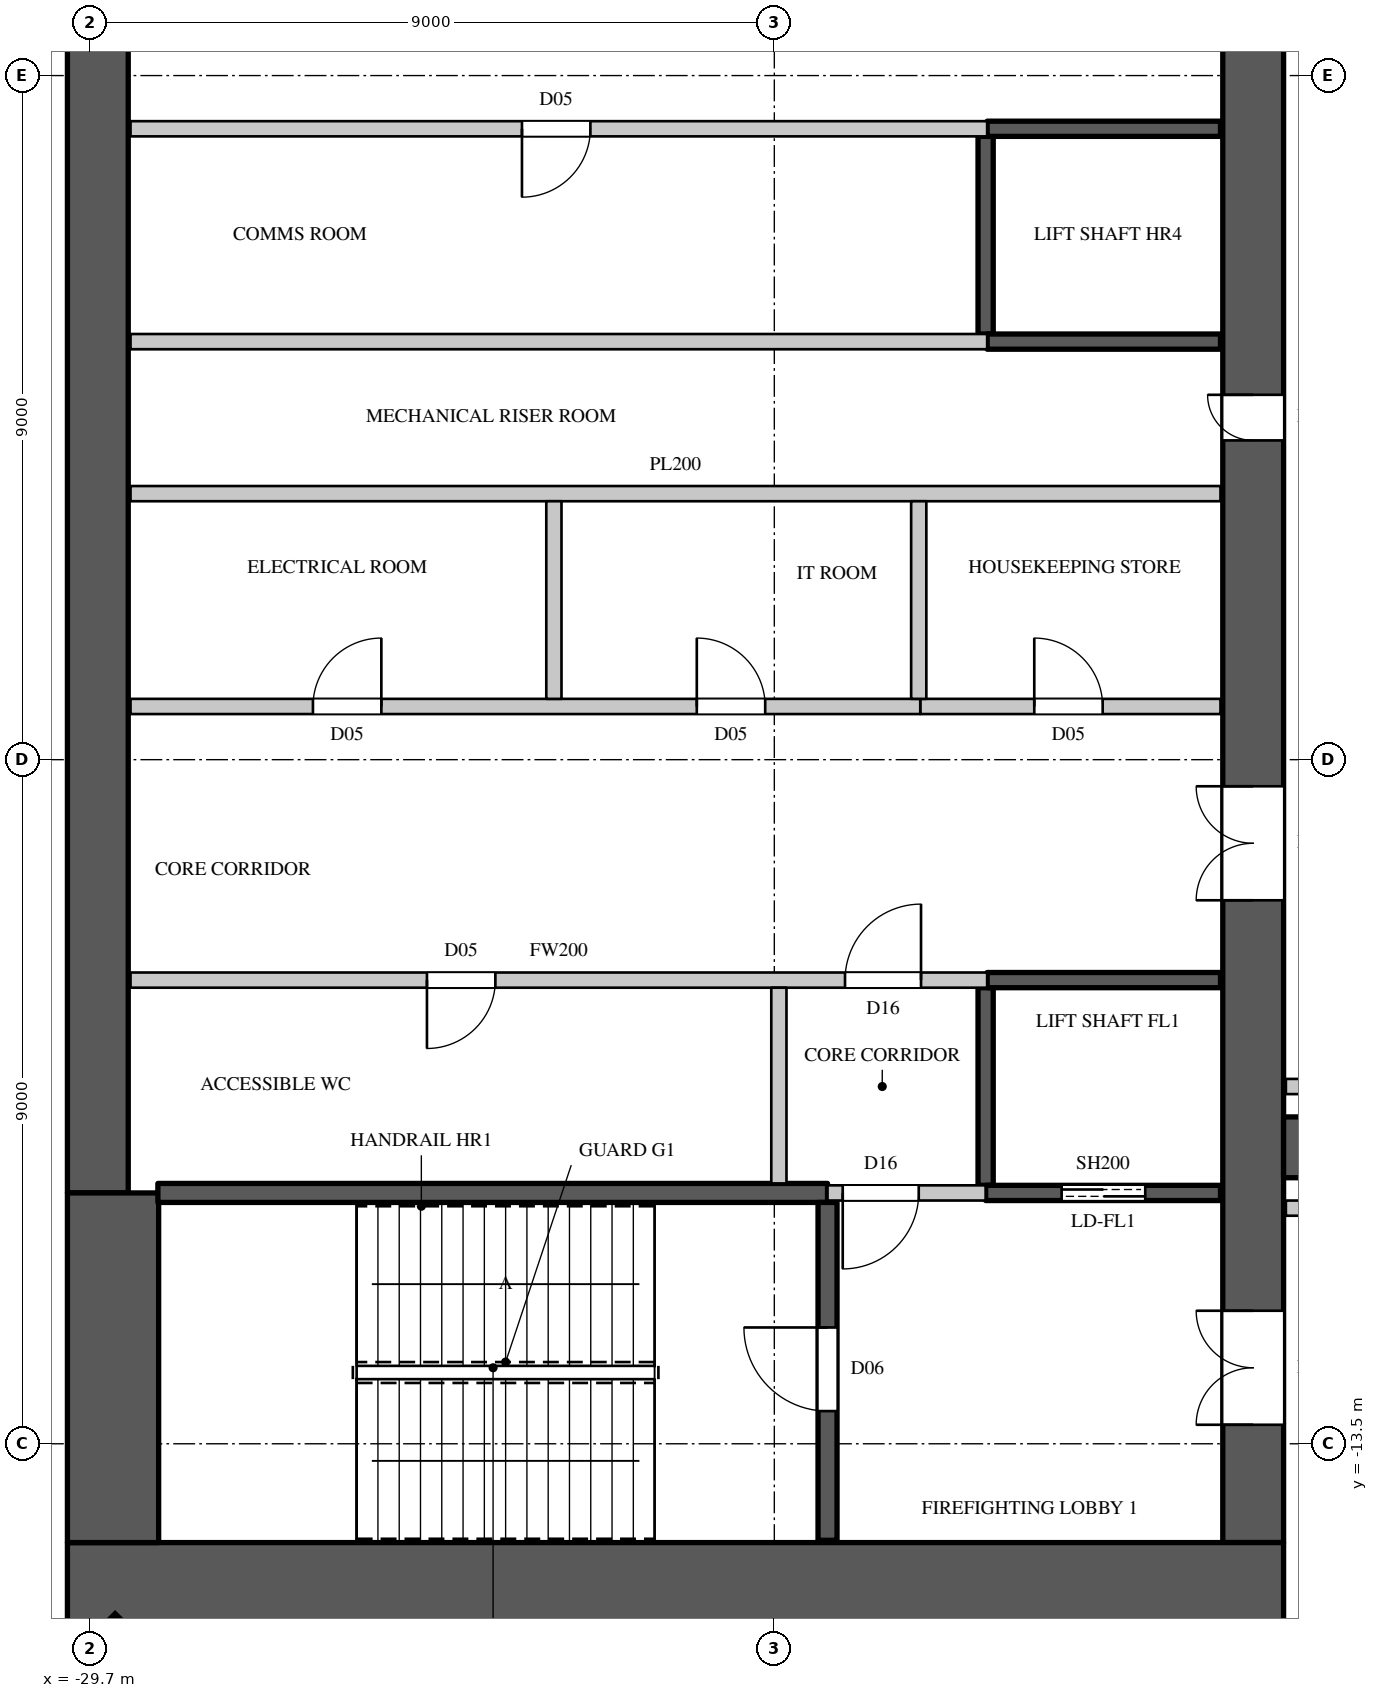
"""IFC4 building model, lengths in metres.
Left out: names, types, materials, properties, quantities, classifications, styles, units other than length and angle.
Written with IfcOpenShell. Run it as: python <this file> out.ifc"""

import sys

from ifc_helpers import new_model, si_unit, direction, frame, frame_2d, origin, origin_2d, place, context, subcontext, project, spatial, rectangle, extrude, element, fill, save


model = new_model("IFC4")
c1 = context("Model", 3, precision=1e-05, world=origin(), true_north=direction((0.0, 1.0)))
c2 = subcontext(c1, "Body", "Model", "MODEL_VIEW")
j1 = project(units=[si_unit("LENGTHUNIT", "METRE"), si_unit("PLANEANGLEUNIT", "RADIAN")], contexts=[c1])
p1 = place(None, origin())
s1 = spatial("IfcSite", under=j1, at=p1, CompositionType="ELEMENT")
p2 = place(p1, origin())
s2 = spatial("IfcBuilding", under=s1, at=p2, CompositionType="ELEMENT")
p3 = place(p2, frame((0.0, 0.0, 238.4)))
s3 = spatial("IfcBuildingStorey", under=s2, at=p3, CompositionType="ELEMENT", Elevation=238.4)
p4 = place(p3, frame((-29.443, -16.443, 0.0), z_axis=(0.0, 0.0, 1.0), x_axis=(0.707106781187, -0.707106781187, 0.0)))
e1 = element("IfcColumn", 1, at=p4, inside=s3, PredefinedType="COLUMN", context=c2, shape_type="SweptSolid", body=[
    extrude(rectangle(XDim=0.9, YDim=1.1, at=origin_2d()), origin(), (0.0, 0.0, 1.0), 5.0),
])
p5 = place(p3, frame((-14.0, -9.6, 0.0), z_axis=(0.0, 0.0, 1.0), x_axis=(1.0, 0.0, 0.0)))
e2 = element("IfcWall", 2, at=p5, inside=s3, PredefinedType="SOLIDWALL", context=c2, shape_type="SweptSolid", body=[
    extrude(rectangle(XDim=12.0, YDim=0.8, at=frame_2d((6.0, 0.0))), origin(), (0.0, 0.0, 1.0), 4.7),
])
p6 = place(p3, frame((-30.0, -15.4, 0.0), z_axis=(0.0, 0.0, 1.0), x_axis=(1.0, 0.0, 0.0)))
e3 = element("IfcWall", 3, at=p6, inside=s3, PredefinedType="SHEAR", context=c2, shape_type="SweptSolid", body=[
    extrude(rectangle(XDim=16.0, YDim=1.2, at=frame_2d((8.0, 0.0))), origin(), (0.0, 0.0, 1.0), 5.0),
])
p7 = place(p3, frame((-14.4, -14.8, 0.0), z_axis=(0.0, 0.0, 1.0), x_axis=(0.0, 1.0, 0.0)))
e4 = element("IfcWall", 4, at=p7, inside=s3, PredefinedType="SHEAR", context=c2, shape_type="SweptSolid", body=[
    extrude(rectangle(XDim=29.6, YDim=0.8, at=frame_2d((14.8, 0.0))), origin(), (0.0, 0.0, 1.0), 5.0),
])
p8 = place(p7, frame((1.55, 0.0, 0.0)))
e5 = element("IfcOpeningElement", 5, at=p8, cuts=e4, PredefinedType="OPENING", context=c2, shape_type="SweptSolid", body=[
    extrude(rectangle(XDim=1.5, YDim=2.4, at=frame_2d((0.75, 1.2))), frame((0.0, 0.41, 0.0), z_axis=(0.0, -1.0, 0.0), x_axis=(1.0, 0.0, 0.0)), (0.0, 0.0, 1.0), 0.82),
])
p9 = place(p7, frame((26.55, 0.0, 0.0)))
e6 = element("IfcOpeningElement", 6, at=p9, cuts=e4, PredefinedType="OPENING", context=c2, shape_type="SweptSolid", body=[
    extrude(rectangle(XDim=1.5, YDim=2.4, at=frame_2d((0.75, 1.2))), frame((0.0, 0.41, 0.0), z_axis=(0.0, -1.0, 0.0), x_axis=(1.0, 0.0, 0.0)), (0.0, 0.0, 1.0), 0.82),
])
p10 = place(p7, frame((8.45, 0.0, 0.0)))
e7 = element("IfcOpeningElement", 7, at=p10, cuts=e4, PredefinedType="OPENING", context=c2, shape_type="SweptSolid", body=[
    extrude(rectangle(XDim=1.5, YDim=2.4, at=frame_2d((0.75, 1.2))), frame((0.0, 0.41, 0.0), z_axis=(0.0, -1.0, 0.0), x_axis=(1.0, 0.0, 0.0)), (0.0, 0.0, 1.0), 0.82),
])
p11 = place(p7, frame((19.65, 0.0, 0.0)))
e8 = element("IfcOpeningElement", 8, at=p11, cuts=e4, PredefinedType="OPENING", context=c2, shape_type="SweptSolid", body=[
    extrude(rectangle(XDim=1.5, YDim=2.4, at=frame_2d((0.75, 1.2))), frame((0.0, 0.41, 0.0), z_axis=(0.0, -1.0, 0.0), x_axis=(1.0, 0.0, 0.0)), (0.0, 0.0, 1.0), 0.82),
])
p12 = place(p7, frame((14.5, 0.0, 0.0)))
e9 = element("IfcOpeningElement", 9, at=p12, cuts=e4, PredefinedType="OPENING", context=c2, shape_type="SweptSolid", body=[
    extrude(rectangle(XDim=0.6, YDim=2.0, at=frame_2d((0.3, 1.0))), frame((0.0, 0.41, 0.0), z_axis=(0.0, -1.0, 0.0), x_axis=(1.0, 0.0, 0.0)), (0.0, 0.0, 1.0), 0.82),
])
p13 = place(p3, frame((-29.6, -10.2, 0.0), z_axis=(0.0, 0.0, 1.0), x_axis=(0.0, 1.0, 0.0)))
e10 = element("IfcWall", 10, at=p13, inside=s3, PredefinedType="SHEAR", context=c2, shape_type="SweptSolid", body=[
    extrude(rectangle(XDim=20.4, YDim=0.8, at=frame_2d((10.2, 0.0))), origin(), (0.0, 0.0, 1.0), 5.0),
])
p14 = place(p3, frame((-29.4, -14.8, 0.0), z_axis=(0.0, 0.0, 1.0), x_axis=(0.0, 1.0, 0.0)))
e11 = element("IfcWall", 11, at=p14, inside=s3, PredefinedType="SHEAR", context=c2, shape_type="SweptSolid", body=[
    extrude(rectangle(XDim=4.6, YDim=1.2, at=frame_2d((2.3, 0.0))), origin(), (0.0, 0.0, 1.0), 5.0),
])
p15 = place(p3, frame((-29.17, -7.4, 0.0), z_axis=(0.0, 0.0, 1.0), x_axis=(1.0, 0.0, 0.0)))
e12 = element("IfcWall", 12, at=p15, inside=s3, PredefinedType="PARTITIONING", context=c2, shape_type="SweptSolid", body=[
    extrude(rectangle(XDim=11.27, YDim=0.2, at=frame_2d((5.635, 0.0))), origin(), (0.0, 0.0, 1.0), 4.7),
])
p16 = place(p15, frame((9.4, 0.0, 0.0)))
e13 = element("IfcOpeningElement", 13, at=p16, cuts=e12, PredefinedType="OPENING", context=c2, shape_type="SweptSolid", body=[
    extrude(rectangle(XDim=1.0, YDim=2.2, at=frame_2d((0.5, 1.1))), frame((0.0, 0.11, 0.0), z_axis=(0.0, -1.0, 0.0), x_axis=(1.0, 0.0, 0.0)), (0.0, 0.0, 1.0), 0.22),
])
p17 = place(p15, frame((3.9, 0.0, 0.0)))
e14 = element("IfcOpeningElement", 14, at=p17, cuts=e12, PredefinedType="OPENING", context=c2, shape_type="SweptSolid", body=[
    extrude(rectangle(XDim=0.9, YDim=2.2, at=frame_2d((0.45, 1.1))), frame((0.0, 0.11, 0.0), z_axis=(0.0, -1.0, 0.0), x_axis=(1.0, 0.0, 0.0)), (0.0, 0.0, 1.0), 0.22),
])
p18 = place(p3, frame((-20.64, -10.075, 0.0), z_axis=(0.0, 0.0, 1.0), x_axis=(0.0, 1.0, 0.0)))
e15 = element("IfcWall", 15, at=p18, inside=s3, PredefinedType="PARTITIONING", context=c2, shape_type="SweptSolid", body=[
    extrude(rectangle(XDim=2.575, YDim=0.2, at=frame_2d((1.288, 0.0))), origin(), (0.0, 0.0, 1.0), 4.7),
])
p19 = place(p3, frame((-20.0, -10.2, 0.0), z_axis=(0.0, 0.0, 1.0), x_axis=(1.0, 0.0, 0.0)))
e16 = element("IfcWall", 16, at=p19, inside=s3, PredefinedType="PARTITIONING", context=c2, shape_type="SweptSolid", body=[
    extrude(rectangle(XDim=2.08, YDim=0.2, at=frame_2d((1.04, 0.0))), origin(), (0.0, 0.0, 1.0), 4.7),
])
p20 = place(p19, frame((0.2, 0.0, 0.0)))
e17 = element("IfcOpeningElement", 17, at=p20, cuts=e16, PredefinedType="OPENING", context=c2, shape_type="SweptSolid", body=[
    extrude(rectangle(XDim=1.0, YDim=2.2, at=frame_2d((0.5, 1.1))), frame((0.0, 0.11, 0.0), z_axis=(0.0, -1.0, 0.0), x_axis=(1.0, 0.0, 0.0)), (0.0, 0.0, 1.0), 0.22),
])
p21 = place(p3, frame((-18.78, -3.8, 0.0), z_axis=(0.0, 0.0, 1.0), x_axis=(1.0, 0.0, 0.0)))
e18 = element("IfcWall", 18, at=p21, inside=s3, PredefinedType="PARTITIONING", context=c2, shape_type="SweptSolid", body=[
    extrude(rectangle(XDim=3.95, YDim=0.2, at=frame_2d((1.975, 0.0))), origin(), (0.0, 0.0, 1.0), 4.7),
])
p22 = place(p21, frame((1.5, 0.0, 0.0)))
e19 = element("IfcOpeningElement", 19, at=p22, cuts=e18, PredefinedType="OPENING", context=c2, shape_type="SweptSolid", body=[
    extrude(rectangle(XDim=0.9, YDim=2.2, at=frame_2d((0.45, 1.1))), frame((0.0, 0.11, 0.0), z_axis=(0.0, -1.0, 0.0), x_axis=(1.0, 0.0, 0.0)), (0.0, 0.0, 1.0), 0.22),
])
p23 = place(p3, frame((-13.97, -10.4, 0.0), z_axis=(0.0, 0.0, 1.0), x_axis=(1.0, 0.0, 0.0)))
e20 = element("IfcWall", 20, at=p23, inside=s3, PredefinedType="PARTITIONING", context=c2, shape_type="SweptSolid", body=[
    extrude(rectangle(XDim=2.37, YDim=0.2, at=frame_2d((1.185, 0.0))), origin(), (0.0, 0.0, 1.0), 4.7),
])
p24 = place(p3, frame((-13.97, -8.8, 0.0), z_axis=(0.0, 0.0, 1.0), x_axis=(1.0, 0.0, 0.0)))
e21 = element("IfcWall", 21, at=p24, inside=s3, PredefinedType="PARTITIONING", context=c2, shape_type="SweptSolid", body=[
    extrude(rectangle(XDim=2.29, YDim=0.2, at=frame_2d((1.145, 0.0))), origin(), (0.0, 0.0, 1.0), 4.7),
])
p25 = place(p3, frame((-29.17, -3.8, 0.0), z_axis=(0.0, 0.0, 1.0), x_axis=(1.0, 0.0, 0.0)))
e22 = element("IfcWall", 22, at=p25, inside=s3, PredefinedType="PARTITIONING", context=c2, shape_type="SweptSolid", body=[
    extrude(rectangle(XDim=10.39, YDim=0.2, at=frame_2d((5.195, 0.0))), origin(), (0.0, 0.0, 1.0), 4.7),
])
p26 = place(p25, frame((2.4, 0.0, 0.0)))
e23 = element("IfcOpeningElement", 23, at=p26, cuts=e22, PredefinedType="OPENING", context=c2, shape_type="SweptSolid", body=[
    extrude(rectangle(XDim=0.9, YDim=2.2, at=frame_2d((0.45, 1.1))), frame((0.0, 0.11, 0.0), z_axis=(0.0, -1.0, 0.0), x_axis=(1.0, 0.0, 0.0)), (0.0, 0.0, 1.0), 0.22),
])
p27 = place(p25, frame((7.45, 0.0, 0.0)))
e24 = element("IfcOpeningElement", 24, at=p27, cuts=e22, PredefinedType="OPENING", context=c2, shape_type="SweptSolid", body=[
    extrude(rectangle(XDim=0.9, YDim=2.2, at=frame_2d((0.45, 1.1))), frame((0.0, 0.11, 0.0), z_axis=(0.0, -1.0, 0.0), x_axis=(1.0, 0.0, 0.0)), (0.0, 0.0, 1.0), 0.22),
])
p28 = place(p3, frame((-29.17, -1.0, 0.0), z_axis=(0.0, 0.0, 1.0), x_axis=(1.0, 0.0, 0.0)))
e25 = element("IfcWall", 25, at=p28, inside=s3, PredefinedType="PARTITIONING", context=c2, shape_type="SweptSolid", body=[
    extrude(rectangle(XDim=14.34, YDim=0.2, at=frame_2d((7.17, 0.0))), origin(), (0.0, 0.0, 1.0), 4.7),
])
p29 = place(p3, frame((-29.17, 1.0, 0.0), z_axis=(0.0, 0.0, 1.0), x_axis=(1.0, 0.0, 0.0)))
e26 = element("IfcWall", 26, at=p29, inside=s3, PredefinedType="PARTITIONING", context=c2, shape_type="SweptSolid", body=[
    extrude(rectangle(XDim=11.27, YDim=0.2, at=frame_2d((5.635, 0.0))), origin(), (0.0, 0.0, 1.0), 4.7),
])
p30 = place(p3, frame((-29.17, 3.8, 0.0), z_axis=(0.0, 0.0, 1.0), x_axis=(1.0, 0.0, 0.0)))
e27 = element("IfcWall", 27, at=p30, inside=s3, PredefinedType="PARTITIONING", context=c2, shape_type="SweptSolid", body=[
    extrude(rectangle(XDim=11.27, YDim=0.2, at=frame_2d((5.635, 0.0))), origin(), (0.0, 0.0, 1.0), 4.7),
])
p31 = place(p30, frame((5.15, 0.0, 0.0)))
e28 = element("IfcOpeningElement", 28, at=p31, cuts=e27, PredefinedType="OPENING", context=c2, shape_type="SweptSolid", body=[
    extrude(rectangle(XDim=0.9, YDim=2.2, at=frame_2d((0.45, 1.1))), frame((0.0, 0.11, 0.0), z_axis=(0.0, -1.0, 0.0), x_axis=(1.0, 0.0, 0.0)), (0.0, 0.0, 1.0), 0.22),
])
for number, where, z_axis, x_axis in (
    (29, (-23.6, -3.7, 0.0), (0.0, 0.0, 1.0), (0.0, 1.0, 0.0)),
    (30, (-18.8, -3.7, 0.0), (0.0, 0.0, 1.0), (0.0, 1.0, 0.0)),
):
    element("IfcWall", number, at=place(p3, frame(where, z_axis=z_axis, x_axis=x_axis)), inside=s3, PredefinedType="PARTITIONING", context=c2, shape_type="SweptSolid", body=[
        extrude(rectangle(XDim=2.6, YDim=0.2, at=frame_2d((1.3, 0.0))), origin(), (0.0, 0.0, 1.0), 4.7),
    ])
p32 = place(p3, frame((-17.92, -10.1, 0.0), z_axis=(0.0, 0.0, 1.0), x_axis=(0.0, 1.0, 0.0)))
e31 = element("IfcWall", 31, at=p32, inside=s3, PredefinedType="SHEAR", context=c2, shape_type="SweptSolid", body=[
    extrude(rectangle(XDim=2.6, YDim=0.2, at=frame_2d((1.3, 0.0))), origin(), (0.0, 0.0, 1.0), 4.7),
])
p33 = place(p3, frame((-17.92, -10.2, 0.0), z_axis=(0.0, 0.0, 1.0), x_axis=(1.0, 0.0, 0.0)))
e32 = element("IfcWall", 32, at=p33, inside=s3, PredefinedType="SHEAR", context=c2, shape_type="SweptSolid", body=[
    extrude(rectangle(XDim=3.09, YDim=0.2, at=frame_2d((1.545, 0.0))), origin(), (0.0, 0.0, 1.0), 4.7),
])
p34 = place(p33, frame((1.0, 0.0, 0.0)))
e33 = element("IfcOpeningElement", 33, at=p34, cuts=e32, PredefinedType="OPENING", context=c2, shape_type="SweptSolid", body=[
    extrude(rectangle(XDim=1.1, YDim=2.2, at=frame_2d((0.55, 1.1))), frame((0.0, 0.11, 0.0), z_axis=(0.0, -1.0, 0.0), x_axis=(1.0, 0.0, 0.0)), (0.0, 0.0, 1.0), 0.22),
])
p35 = place(p3, frame((-17.9, -7.4, 0.0), z_axis=(0.0, 0.0, 1.0), x_axis=(1.0, 0.0, 0.0)))
e34 = element("IfcWall", 34, at=p35, inside=s3, PredefinedType="SHEAR", context=c2, shape_type="SweptSolid", body=[
    extrude(rectangle(XDim=3.07, YDim=0.2, at=frame_2d((1.535, 0.0))), origin(), (0.0, 0.0, 1.0), 4.7),
])
p36 = place(p3, frame((-17.92, 1.1, 0.0), z_axis=(0.0, 0.0, 1.0), x_axis=(0.0, 1.0, 0.0)))
e35 = element("IfcWall", 35, at=p36, inside=s3, PredefinedType="SHEAR", context=c2, shape_type="SweptSolid", body=[
    extrude(rectangle(XDim=2.6, YDim=0.2, at=frame_2d((1.3, 0.0))), origin(), (0.0, 0.0, 1.0), 4.7),
])
for number, where, z_axis, x_axis in (
    (36, (-17.9, 1.0, 0.0), (0.0, 0.0, 1.0), (1.0, 0.0, 0.0)),
    (37, (-17.9, 3.8, 0.0), (0.0, 0.0, 1.0), (1.0, 0.0, 0.0)),
):
    element("IfcWall", number, at=place(p3, frame(where, z_axis=z_axis, x_axis=x_axis)), inside=s3, PredefinedType="SHEAR", context=c2, shape_type="SweptSolid", body=[
        extrude(rectangle(XDim=3.07, YDim=0.2, at=frame_2d((1.535, 0.0))), origin(), (0.0, 0.0, 1.0), 4.7),
    ])
p37 = place(p3, frame((-28.81, -10.2, 0.0), z_axis=(0.0, 0.0, 1.0), x_axis=(1.0, 0.0, 0.0)))
e38 = element("IfcWall", 38, at=p37, inside=s3, PredefinedType="SHEAR", context=c2, shape_type="SweptSolid", body=[
    extrude(rectangle(XDim=8.81, YDim=0.25, at=frame_2d((4.405, 0.0))), origin(), (0.0, 0.0, 1.0), 4.7),
])
p38 = place(p3, frame((-20.0, -14.77, 0.0), z_axis=(0.0, 0.0, 1.0), x_axis=(0.0, 1.0, 0.0)))
e39 = element("IfcWall", 39, at=p38, inside=s3, PredefinedType="SHEAR", context=c2, shape_type="SweptSolid", body=[
    extrude(rectangle(XDim=4.445, YDim=0.25, at=frame_2d((2.223, 0.0))), origin(), (0.0, 0.0, 1.0), 4.7),
])
p39 = place(p38, frame((1.7, 0.0, 0.0)))
e40 = element("IfcOpeningElement", 40, at=p39, cuts=e39, PredefinedType="OPENING", context=c2, shape_type="SweptSolid", body=[
    extrude(rectangle(XDim=1.1, YDim=2.2, at=frame_2d((0.55, 1.1))), frame((0.0, 0.135, 0.0), z_axis=(0.0, -1.0, 0.0), x_axis=(1.0, 0.0, 0.0)), (0.0, 0.0, 1.0), 0.27),
])
p40 = place(p39, origin())
e41 = element("IfcDoor", 41, at=p40, inside=s3, OperationType="SINGLE_SWING_RIGHT", PredefinedType="DOOR", context=c2, shape_type="SweptSolid", body=[
    extrude(rectangle(XDim=1.1, YDim=2.2, at=frame_2d((0.55, 1.1))), frame((0.0, 0.025, 0.0), z_axis=(0.0, -1.0, 0.0), x_axis=(1.0, 0.0, 0.0)), (0.0, 0.0, 1.0), 0.05),
])
fill(e40, e41)
p41 = place(p16, origin())
e42 = element("IfcDoor", 42, at=p41, inside=s3, OperationType="SINGLE_SWING_RIGHT", PredefinedType="DOOR", context=c2, shape_type="SweptSolid", body=[
    extrude(rectangle(XDim=1.0, YDim=2.2, at=frame_2d((0.5, 1.1))), frame((0.0, 0.025, 0.0), z_axis=(0.0, -1.0, 0.0), x_axis=(1.0, 0.0, 0.0)), (0.0, 0.0, 1.0), 0.05),
])
fill(e13, e42)
p42 = place(p20, origin())
e43 = element("IfcDoor", 43, at=p42, inside=s3, OperationType="SINGLE_SWING_RIGHT", PredefinedType="DOOR", context=c2, shape_type="SweptSolid", body=[
    extrude(rectangle(XDim=1.0, YDim=2.2, at=frame_2d((0.5, 1.1))), frame((0.0, 0.025, 0.0), z_axis=(0.0, -1.0, 0.0), x_axis=(1.0, 0.0, 0.0)), (0.0, 0.0, 1.0), 0.05),
])
fill(e17, e43)
p43 = place(p17, origin())
e44 = element("IfcDoor", 44, at=p43, inside=s3, OperationType="SINGLE_SWING_RIGHT", PredefinedType="DOOR", context=c2, shape_type="SweptSolid", body=[
    extrude(rectangle(XDim=0.9, YDim=2.2, at=frame_2d((0.45, 1.1))), frame((0.0, 0.025, 0.0), z_axis=(0.0, -1.0, 0.0), x_axis=(1.0, 0.0, 0.0)), (0.0, 0.0, 1.0), 0.05),
])
fill(e14, e44)
p44 = place(p26, origin())
e45 = element("IfcDoor", 45, at=p44, inside=s3, OperationType="SINGLE_SWING_RIGHT", PredefinedType="DOOR", context=c2, shape_type="SweptSolid", body=[
    extrude(rectangle(XDim=0.9, YDim=2.2, at=frame_2d((0.45, 1.1))), frame((0.0, 0.025, 0.0), z_axis=(0.0, -1.0, 0.0), x_axis=(1.0, 0.0, 0.0)), (0.0, 0.0, 1.0), 0.05),
])
fill(e23, e45)
p45 = place(p27, origin())
e46 = element("IfcDoor", 46, at=p45, inside=s3, OperationType="SINGLE_SWING_LEFT", PredefinedType="DOOR", context=c2, shape_type="SweptSolid", body=[
    extrude(rectangle(XDim=0.9, YDim=2.2, at=frame_2d((0.45, 1.1))), frame((0.0, 0.025, 0.0), z_axis=(0.0, -1.0, 0.0), x_axis=(1.0, 0.0, 0.0)), (0.0, 0.0, 1.0), 0.05),
])
fill(e24, e46)
p46 = place(p22, origin())
e47 = element("IfcDoor", 47, at=p46, inside=s3, OperationType="SINGLE_SWING_LEFT", PredefinedType="DOOR", context=c2, shape_type="SweptSolid", body=[
    extrude(rectangle(XDim=0.9, YDim=2.2, at=frame_2d((0.45, 1.1))), frame((0.0, 0.025, 0.0), z_axis=(0.0, -1.0, 0.0), x_axis=(1.0, 0.0, 0.0)), (0.0, 0.0, 1.0), 0.05),
])
fill(e19, e47)
p47 = place(p31, origin())
e48 = element("IfcDoor", 48, at=p47, inside=s3, OperationType="SINGLE_SWING_RIGHT", PredefinedType="DOOR", context=c2, shape_type="SweptSolid", body=[
    extrude(rectangle(XDim=0.9, YDim=2.2, at=frame_2d((0.45, 1.1))), frame((0.0, 0.025, 0.0), z_axis=(0.0, -1.0, 0.0), x_axis=(1.0, 0.0, 0.0)), (0.0, 0.0, 1.0), 0.05),
])
fill(e28, e48)
p48 = place(p34, origin())
e49 = element("IfcDoor", 49, at=p48, inside=s3, OperationType="DOUBLE_DOOR_SLIDING", PredefinedType="DOOR", context=c2, shape_type="SweptSolid", body=[
    extrude(rectangle(XDim=1.1, YDim=2.2, at=frame_2d((0.55, 1.1))), frame((0.0, 0.025, 0.0), z_axis=(0.0, -1.0, 0.0), x_axis=(1.0, 0.0, 0.0)), (0.0, 0.0, 1.0), 0.05),
])
fill(e33, e49)
p49 = place(p8, origin())
e50 = element("IfcDoor", 50, at=p49, inside=s3, OperationType="DOUBLE_DOOR_SINGLE_SWING", PredefinedType="DOOR", context=c2, shape_type="SweptSolid", body=[
    extrude(rectangle(XDim=1.5, YDim=2.4, at=frame_2d((0.75, 1.2))), frame((0.0, 0.395, 0.0), z_axis=(0.0, -1.0, 0.0), x_axis=(1.0, 0.0, 0.0)), (0.0, 0.0, 1.0), 0.05),
])
fill(e5, e50)
p50 = place(p10, origin())
e51 = element("IfcDoor", 51, at=p50, inside=s3, OperationType="DOUBLE_DOOR_SINGLE_SWING", PredefinedType="DOOR", context=c2, shape_type="SweptSolid", body=[
    extrude(rectangle(XDim=1.5, YDim=2.4, at=frame_2d((0.75, 1.2))), frame((0.0, 0.395, 0.0), z_axis=(0.0, -1.0, 0.0), x_axis=(1.0, 0.0, 0.0)), (0.0, 0.0, 1.0), 0.05),
])
fill(e7, e51)
p51 = place(p12, origin())
e52 = element("IfcDoor", 52, at=p51, inside=s3, OperationType="SINGLE_SWING_RIGHT", PredefinedType="DOOR", context=c2, shape_type="SweptSolid", body=[
    extrude(rectangle(XDim=0.6, YDim=2.0, at=frame_2d((0.3, 1.0))), frame((0.0, 0.395, 0.0), z_axis=(0.0, -1.0, 0.0), x_axis=(1.0, 0.0, 0.0)), (0.0, 0.0, 1.0), 0.05),
])
fill(e9, e52)
save(model, sys.argv[1])
